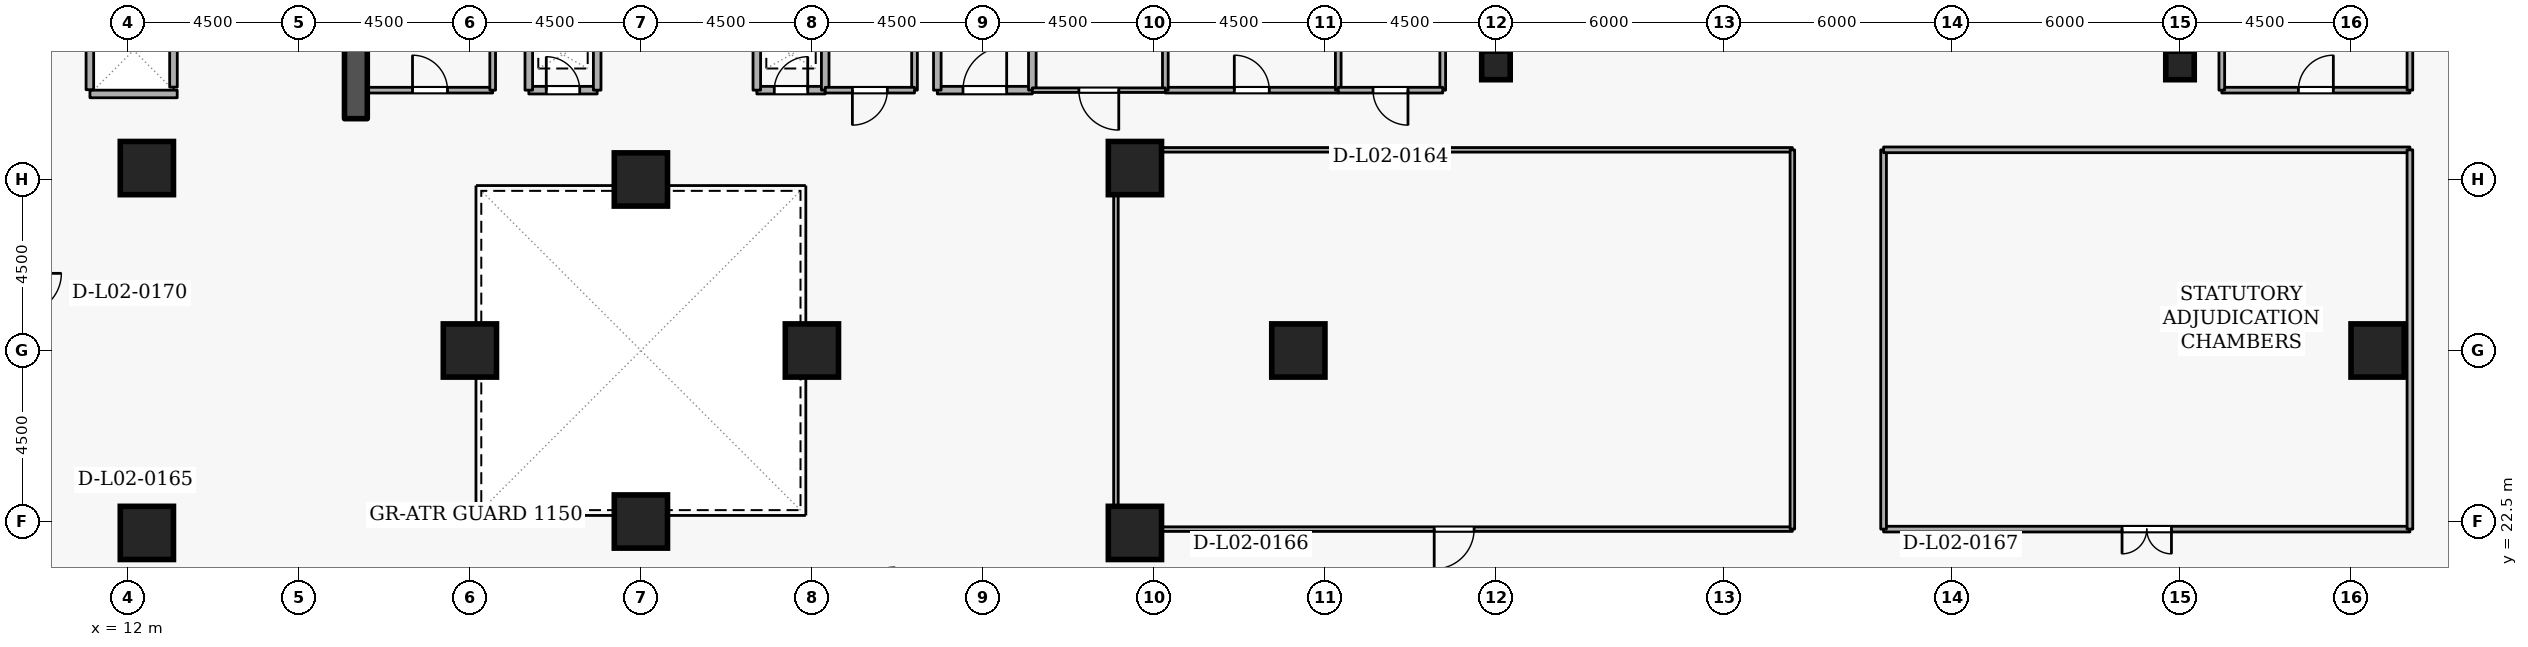
"""IFC4 building model, lengths in metres.
Left out: names, types, materials, properties, quantities, classifications, styles, units other than length and angle.
Written with IfcOpenShell. Run it as: python <this file> out.ifc"""

import sys

from ifc_helpers import new_model, si_unit, direction, frame, frame_2d, origin, origin_2d, place, context, subcontext, project, spatial, rectangle, extrude, element, fill, save


model = new_model("IFC4")
c1 = context("Model", 3, precision=1e-05, world=origin(), true_north=direction((0.0, 1.0)))
c2 = subcontext(c1, "Body", "Model", "MODEL_VIEW")
j1 = project(units=[si_unit("LENGTHUNIT", "METRE"), si_unit("PLANEANGLEUNIT", "RADIAN")], contexts=[c1])
p1 = place(None, origin())
s1 = spatial("IfcSite", under=j1, at=p1, CompositionType="ELEMENT")
p2 = place(p1, origin())
s2 = spatial("IfcBuilding", under=s1, at=p2, CompositionType="ELEMENT")
p3 = place(p2, frame((0.0, 0.0, 9.6)))
s3 = spatial("IfcBuildingStorey", under=s2, at=p3, CompositionType="ELEMENT", Elevation=9.6)
p4 = place(p3, frame((18.0, 33.1, 0.0), z_axis=(0.0, 0.0, 1.0), x_axis=(0.0, 1.0, 0.0)))
e1 = element("IfcWall", 1, at=p4, inside=s3, PredefinedType="SHEAR", context=c2, shape_type="SweptSolid", body=[
    extrude(rectangle(XDim=5.7, YDim=0.6, at=frame_2d((2.85, 0.0))), origin(), (0.0, 0.0, 1.0), 4.5),
])
for number, where, z_axis, x_axis in (
    (2, (42.8, 27.0, 0.0), (0.0, 0.0, 1.0), (1.0, 0.0, 0.0)),
    (3, (12.5, 22.2, 0.0), (0.0, 0.0, 1.0), (1.0, 0.0, 0.0)),
    (4, (38.5, 22.2, 0.0), (0.0, 0.0, 1.0), (1.0, 0.0, 0.0)),
    (5, (12.5, 31.8, 0.0), (0.0, 0.0, 1.0), (1.0, 0.0, 0.0)),
    (6, (38.5, 31.8, 0.0), (0.0, 0.0, 1.0), (1.0, 0.0, 0.0)),
    (7, (25.5, 22.5, 0.0), (0.0, 0.0, 1.0), (1.0, 0.0, 0.0)),
    (8, (25.5, 31.5, 0.0), (0.0, 0.0, 1.0), (1.0, 0.0, 0.0)),
    (9, (21.0, 27.0, 0.0), (0.0, 0.0, 1.0), (1.0, 0.0, 0.0)),
    (10, (30.0, 27.0, 0.0), (0.0, 0.0, 1.0), (1.0, 0.0, 0.0)),
    (11, (71.2, 27.0, 0.0), (0.0, 0.0, 1.0), (1.0, 0.0, 0.0)),
):
    element("IfcColumn", number, at=place(p3, frame(where, z_axis=z_axis, x_axis=x_axis)), inside=s3, PredefinedType="COLUMN", context=c2, shape_type="SweptSolid", body=[
        extrude(rectangle(XDim=1.4, YDim=1.4, at=origin_2d()), origin(), (0.0, 0.0, 1.0), 4.5),
    ])
for number, where, z_axis, x_axis in (
    (12, (48.0, 34.5, 0.0), (0.0, 0.0, 1.0), (1.0, 0.0, 0.0)),
    (13, (66.0, 34.5, 0.0), (0.0, 0.0, 1.0), (1.0, 0.0, 0.0)),
):
    element("IfcColumn", number, at=place(p3, frame(where, z_axis=z_axis, x_axis=x_axis)), inside=s3, PredefinedType="COLUMN", context=c2, shape_type="SweptSolid", body=[
        extrude(rectangle(XDim=0.75, YDim=0.75, at=origin_2d()), origin(), (0.0, 0.0, 1.0), 4.5),
    ])
p5 = place(p3, frame((13.2, 33.93, 0.0), z_axis=(0.0, 0.0, 1.0), x_axis=(0.0, 1.0, 0.0)))
e14 = element("IfcWall", 14, at=p5, inside=s3, PredefinedType="STANDARD", context=c2, shape_type="SweptSolid", body=[
    extrude(rectangle(XDim=1.94, YDim=0.2, at=frame_2d((0.97, 0.0))), origin(), (0.0, 0.0, 1.0), 4.16),
])
p6 = place(p3, frame((11.002, 33.75, 0.0), z_axis=(0.0, 0.0, 1.0), x_axis=(1.0, 0.0, 0.0)))
e15 = element("IfcWall", 15, at=p6, inside=s3, PredefinedType="STANDARD", context=c2, shape_type="SweptSolid", body=[
    extrude(rectangle(XDim=2.296, YDim=0.2, at=frame_2d((1.148, 0.0))), origin(), (0.0, 0.0, 1.0), 4.16),
])
p7 = place(p3, frame((11.0, 33.862, 0.0), z_axis=(0.0, 0.0, 1.0), x_axis=(0.0, 1.0, 0.0)))
e16 = element("IfcWall", 16, at=p7, inside=s3, PredefinedType="STANDARD", context=c2, shape_type="SweptSolid", body=[
    extrude(rectangle(XDim=2.076, YDim=0.2, at=frame_2d((1.038, 0.0))), origin(), (0.0, 0.0, 1.0), 4.16),
])
p8 = place(p3, frame((33.3, 33.85, 0.0), z_axis=(0.0, 0.0, 1.0), x_axis=(1.0, 0.0, 0.0)))
e17 = element("IfcWall", 17, at=p8, inside=s3, PredefinedType="STANDARD", context=c2, shape_type="SweptSolid", body=[
    extrude(rectangle(XDim=2.5, YDim=0.2, at=frame_2d((1.25, 0.0))), origin(), (0.0, 0.0, 1.0), 4.16),
])
p9 = place(p8, frame((0.675, 0.0, 0.0)))
e18 = element("IfcOpeningElement", 18, at=p9, cuts=e17, PredefinedType="OPENING", context=c2, shape_type="SweptSolid", body=[
    extrude(rectangle(XDim=1.15, YDim=2.1, at=frame_2d((0.575, 1.05))), frame((0.0, 0.11, 0.0), z_axis=(0.0, -1.0, 0.0), x_axis=(1.0, 0.0, 0.0)), (0.0, 0.0, 1.0), 0.22),
])
p10 = place(p3, frame((35.8, 33.85, 0.0), z_axis=(0.0, 0.0, 1.0), x_axis=(0.0, 1.0, 0.0)))
e19 = element("IfcWall", 19, at=p10, inside=s3, PredefinedType="STANDARD", context=c2, shape_type="SweptSolid", body=[
    extrude(rectangle(XDim=5.15, YDim=0.2, at=frame_2d((2.575, 0.0))), origin(), (0.0, 0.0, 1.0), 4.16),
])
p11 = place(p3, frame((33.3, 35.6, 0.0), z_axis=(0.0, 0.0, 1.0), x_axis=(0.0, -1.0, 0.0)))
e20 = element("IfcWall", 20, at=p11, inside=s3, PredefinedType="STANDARD", context=c2, shape_type="SweptSolid", body=[
    extrude(rectangle(XDim=1.75, YDim=0.2, at=frame_2d((0.875, 0.0))), origin(), (0.0, 0.0, 1.0), 3.365),
])
p12 = place(p3, frame((22.55, 33.85, 0.0), z_axis=(0.0, 0.0, 1.0), x_axis=(1.0, 0.0, 0.0)))
e21 = element("IfcWall", 21, at=p12, inside=s3, PredefinedType="STANDARD", context=c2, shape_type="SweptSolid", body=[
    extrude(rectangle(XDim=1.8, YDim=0.2, at=frame_2d((0.9, 0.0))), origin(), (0.0, 0.0, 1.0), 4.16),
])
p13 = place(p12, frame((0.46, 0.0, 0.0)))
e22 = element("IfcOpeningElement", 22, at=p13, cuts=e21, PredefinedType="OPENING", context=c2, shape_type="SweptSolid", body=[
    extrude(rectangle(XDim=0.88, YDim=2.04, at=frame_2d((0.44, 1.02))), frame((0.0, 0.11, 0.0), z_axis=(0.0, -1.0, 0.0), x_axis=(1.0, 0.0, 0.0)), (0.0, 0.0, 1.0), 0.22),
])
for number, where, z_axis, x_axis in (
    (23, (24.35, 33.85, 0.0), (0.0, 0.0, 1.0), (0.0, 1.0, 0.0)),
    (24, (22.55, 35.35, 0.0), (0.0, 0.0, 1.0), (0.0, -1.0, 0.0)),
):
    element("IfcWall", number, at=place(p3, frame(where, z_axis=z_axis, x_axis=x_axis)), inside=s3, PredefinedType="STANDARD", context=c2, shape_type="SweptSolid", body=[
        extrude(rectangle(XDim=1.5, YDim=0.2, at=frame_2d((0.75, 0.0))), origin(), (0.0, 0.0, 1.0), 4.16),
    ])
p14 = place(p3, frame((28.55, 33.85, 0.0), z_axis=(0.0, 0.0, 1.0), x_axis=(1.0, 0.0, 0.0)))
e25 = element("IfcWall", 25, at=p14, inside=s3, PredefinedType="STANDARD", context=c2, shape_type="SweptSolid", body=[
    extrude(rectangle(XDim=1.8, YDim=0.2, at=frame_2d((0.9, 0.0))), origin(), (0.0, 0.0, 1.0), 4.16),
])
p15 = place(p14, frame((0.46, 0.0, 0.0)))
e26 = element("IfcOpeningElement", 26, at=p15, cuts=e25, PredefinedType="OPENING", context=c2, shape_type="SweptSolid", body=[
    extrude(rectangle(XDim=0.88, YDim=2.04, at=frame_2d((0.44, 1.02))), frame((0.0, 0.11, 0.0), z_axis=(0.0, -1.0, 0.0), x_axis=(1.0, 0.0, 0.0)), (0.0, 0.0, 1.0), 0.22),
])
for number, where, z_axis, x_axis in (
    (27, (30.35, 33.85, 0.0), (0.0, 0.0, 1.0), (0.0, 1.0, 0.0)),
    (28, (28.55, 35.35, 0.0), (0.0, 0.0, 1.0), (0.0, -1.0, 0.0)),
):
    element("IfcWall", number, at=place(p3, frame(where, z_axis=z_axis, x_axis=x_axis)), inside=s3, PredefinedType="STANDARD", context=c2, shape_type="SweptSolid", body=[
        extrude(rectangle(XDim=1.5, YDim=0.2, at=frame_2d((0.75, 0.0))), origin(), (0.0, 0.0, 1.0), 4.16),
    ])
p16 = place(p3, frame((18.3, 33.85, 0.0), z_axis=(0.0, 0.0, 1.0), x_axis=(1.0, 0.0, 0.0)))
e29 = element("IfcWall", 29, at=p16, inside=s3, PredefinedType="PARTITIONING", context=c2, shape_type="SweptSolid", body=[
    extrude(rectangle(XDim=3.3, YDim=0.15, at=frame_2d((1.65, 0.0))), origin(), (0.0, 0.0, 1.0), 4.16),
])
p17 = place(p16, frame((1.19, 0.0, 0.0)))
e30 = element("IfcOpeningElement", 30, at=p17, cuts=e29, PredefinedType="OPENING", context=c2, shape_type="SweptSolid", body=[
    extrude(rectangle(XDim=0.92, YDim=2.08, at=frame_2d((0.46, 1.04))), frame((0.0, 0.085, 0.0), z_axis=(0.0, -1.0, 0.0), x_axis=(1.0, 0.0, 0.0)), (0.0, 0.0, 1.0), 0.17),
])
p18 = place(p3, frame((21.6, 33.85, 0.0), z_axis=(0.0, 0.0, 1.0), x_axis=(0.0, 1.0, 0.0)))
e31 = element("IfcWall", 31, at=p18, inside=s3, PredefinedType="PARTITIONING", context=c2, shape_type="SweptSolid", body=[
    extrude(rectangle(XDim=1.5, YDim=0.15, at=frame_2d((0.75, 0.0))), origin(), (0.0, 0.0, 1.0), 4.16),
])
p19 = place(p3, frame((32.7, 35.35, 0.0), z_axis=(0.0, 0.0, 1.0), x_axis=(0.0, -1.0, 0.0)))
e32 = element("IfcWall", 32, at=p19, inside=s3, PredefinedType="PARTITIONING", context=c2, shape_type="SweptSolid", body=[
    extrude(rectangle(XDim=1.5, YDim=0.15, at=frame_2d((0.75, 0.0))), origin(), (0.0, 0.0, 1.0), 3.365),
])
p20 = place(p3, frame((32.7, 33.85, 0.0), z_axis=(0.0, 0.0, 1.0), x_axis=(-1.0, 0.0, 0.0)))
e33 = element("IfcWall", 33, at=p20, inside=s3, PredefinedType="PARTITIONING", context=c2, shape_type="SweptSolid", body=[
    extrude(rectangle(XDim=2.35, YDim=0.15, at=frame_2d((1.175, 0.0))), origin(), (0.0, 0.0, 1.0), 4.16),
])
p21 = place(p20, frame((0.715, 0.0, 0.0)))
e34 = element("IfcOpeningElement", 34, at=p21, cuts=e33, PredefinedType="OPENING", context=c2, shape_type="SweptSolid", body=[
    extrude(rectangle(XDim=0.92, YDim=2.08, at=frame_2d((0.46, 1.04))), frame((0.0, 0.085, 0.0), z_axis=(0.0, -1.0, 0.0), x_axis=(1.0, 0.0, 0.0)), (0.0, 0.0, 1.0), 0.17),
])
p22 = place(p3, frame((39.3, 33.85, 0.0), z_axis=(0.0, 0.0, 1.0), x_axis=(1.0, 0.0, 0.0)))
e35 = element("IfcWall", 35, at=p22, inside=s3, PredefinedType="PARTITIONING", context=c2, shape_type="SweptSolid", body=[
    extrude(rectangle(XDim=4.55, YDim=0.15, at=frame_2d((2.275, 0.0))), origin(), (0.0, 0.0, 1.0), 4.16),
])
p23 = place(p22, frame((1.815, 0.0, 0.0)))
e36 = element("IfcOpeningElement", 36, at=p23, cuts=e35, PredefinedType="OPENING", context=c2, shape_type="SweptSolid", body=[
    extrude(rectangle(XDim=0.92, YDim=2.08, at=frame_2d((0.46, 1.04))), frame((0.0, 0.085, 0.0), z_axis=(0.0, -1.0, 0.0), x_axis=(1.0, 0.0, 0.0)), (0.0, 0.0, 1.0), 0.17),
])
for number, where, z_axis, x_axis in (
    (37, (43.85, 33.85, 0.0), (0.0, 0.0, 1.0), (0.0, 1.0, 0.0)),
    (38, (39.3, 37.8, 0.0), (0.0, 0.0, 1.0), (0.0, -1.0, 0.0)),
):
    element("IfcWall", number, at=place(p3, frame(where, z_axis=z_axis, x_axis=x_axis)), inside=s3, PredefinedType="PARTITIONING", context=c2, shape_type="SweptSolid", body=[
        extrude(rectangle(XDim=3.95, YDim=0.15, at=frame_2d((1.975, 0.0))), origin(), (0.0, 0.0, 1.0), 4.16),
    ])
p24 = place(p3, frame((67.1, 33.85, 0.0), z_axis=(0.0, 0.0, 1.0), x_axis=(1.0, 0.0, 0.0)))
e39 = element("IfcWall", 39, at=p24, inside=s3, PredefinedType="PARTITIONING", context=c2, shape_type="SweptSolid", body=[
    extrude(rectangle(XDim=4.95, YDim=0.15, at=frame_2d((2.475, 0.0))), origin(), (0.0, 0.0, 1.0), 4.16),
])
p25 = place(p24, frame((2.015, 0.0, 0.0)))
e40 = element("IfcOpeningElement", 40, at=p25, cuts=e39, PredefinedType="OPENING", context=c2, shape_type="SweptSolid", body=[
    extrude(rectangle(XDim=0.92, YDim=2.08, at=frame_2d((0.46, 1.04))), frame((0.0, 0.085, 0.0), z_axis=(0.0, -1.0, 0.0), x_axis=(1.0, 0.0, 0.0)), (0.0, 0.0, 1.0), 0.17),
])
for number, where, z_axis, x_axis in (
    (41, (72.05, 33.85, 0.0), (0.0, 0.0, 1.0), (0.0, 1.0, 0.0)),
    (42, (67.1, 37.8, 0.0), (0.0, 0.0, 1.0), (0.0, -1.0, 0.0)),
    (43, (46.6, 37.8, 0.0), (0.0, 0.0, 1.0), (0.0, -1.0, 0.0)),
):
    element("IfcWall", number, at=place(p3, frame(where, z_axis=z_axis, x_axis=x_axis)), inside=s3, PredefinedType="PARTITIONING", context=c2, shape_type="SweptSolid", body=[
        extrude(rectangle(XDim=3.95, YDim=0.15, at=frame_2d((1.975, 0.0))), origin(), (0.0, 0.0, 1.0), 4.16),
    ])
p26 = place(p3, frame((46.6, 33.85, 0.0), z_axis=(0.0, 0.0, 1.0), x_axis=(-1.0, 0.0, 0.0)))
e44 = element("IfcWall", 44, at=p26, inside=s3, PredefinedType="PARTITIONING", context=c2, shape_type="SweptSolid", body=[
    extrude(rectangle(XDim=2.75, YDim=0.15, at=frame_2d((1.375, 0.0))), origin(), (0.0, 0.0, 1.0), 4.16),
])
p27 = place(p26, frame((0.915, 0.0, 0.0)))
e45 = element("IfcOpeningElement", 45, at=p27, cuts=e44, PredefinedType="OPENING", context=c2, shape_type="SweptSolid", body=[
    extrude(rectangle(XDim=0.92, YDim=2.08, at=frame_2d((0.46, 1.04))), frame((0.0, 0.085, 0.0), z_axis=(0.0, -1.0, 0.0), x_axis=(1.0, 0.0, 0.0)), (0.0, 0.0, 1.0), 0.17),
])
p28 = place(p3, frame((55.8, 22.3, 0.0), z_axis=(0.0, 0.0, 1.0), x_axis=(-1.0, 0.0, 0.0)))
e46 = element("IfcWall", 46, at=p28, inside=s3, PredefinedType="PARTITIONING", context=c2, shape_type="SweptSolid", body=[
    extrude(rectangle(XDim=17.8, YDim=0.12, at=frame_2d((8.9, 0.0))), origin(), (0.0, 0.0, 1.0), 4.16),
])
p29 = place(p28, frame((8.375, 0.0, 0.0)))
e47 = element("IfcOpeningElement", 47, at=p29, cuts=e46, PredefinedType="OPENING", context=c2, shape_type="SweptSolid", body=[
    extrude(rectangle(XDim=1.05, YDim=2.1, at=frame_2d((0.525, 1.05))), frame((0.0, 0.07, 0.0), z_axis=(0.0, -1.0, 0.0), x_axis=(1.0, 0.0, 0.0)), (0.0, 0.0, 1.0), 0.14),
])
p30 = place(p3, frame((38.0, 22.3, 0.0), z_axis=(0.0, 0.0, 1.0), x_axis=(0.0, 1.0, 0.0)))
e48 = element("IfcWall", 48, at=p30, inside=s3, PredefinedType="PARTITIONING", context=c2, shape_type="SweptSolid", body=[
    extrude(rectangle(XDim=9.98, YDim=0.12, at=frame_2d((4.99, 0.0))), origin(), (0.0, 0.0, 1.0), 4.16),
])
p31 = place(p3, frame((38.0, 32.28, 0.0), z_axis=(0.0, 0.0, 1.0), x_axis=(1.0, 0.0, 0.0)))
e49 = element("IfcWall", 49, at=p31, inside=s3, PredefinedType="PARTITIONING", context=c2, shape_type="SweptSolid", body=[
    extrude(rectangle(XDim=17.8, YDim=0.12, at=frame_2d((8.9, 0.0))), origin(), (0.0, 0.0, 1.0), 4.16),
])
p32 = place(p3, frame((55.8, 32.28, 0.0), z_axis=(0.0, 0.0, 1.0), x_axis=(0.0, -1.0, 0.0)))
e50 = element("IfcWall", 50, at=p32, inside=s3, PredefinedType="PARTITIONING", context=c2, shape_type="SweptSolid", body=[
    extrude(rectangle(XDim=9.98, YDim=0.12, at=frame_2d((4.99, 0.0))), origin(), (0.0, 0.0, 1.0), 4.16),
])
p33 = place(p3, frame((72.05, 22.3, 0.0), z_axis=(0.0, 0.0, 1.0), x_axis=(-1.0, 0.0, 0.0)))
e51 = element("IfcWall", 51, at=p33, inside=s3, PredefinedType="PARTITIONING", context=c2, shape_type="SweptSolid", body=[
    extrude(rectangle(XDim=13.85, YDim=0.15, at=frame_2d((6.925, 0.0))), origin(), (0.0, 0.0, 1.0), 4.16),
])
p34 = place(p33, frame((6.275, 0.0, 0.0)))
e52 = element("IfcOpeningElement", 52, at=p34, cuts=e51, PredefinedType="OPENING", context=c2, shape_type="SweptSolid", body=[
    extrude(rectangle(XDim=1.3, YDim=2.12, at=frame_2d((0.65, 1.06))), frame((0.0, 0.085, 0.0), z_axis=(0.0, -1.0, 0.0), x_axis=(1.0, 0.0, 0.0)), (0.0, 0.0, 1.0), 0.17),
])
p35 = place(p3, frame((58.2, 22.3, 0.0), z_axis=(0.0, 0.0, 1.0), x_axis=(0.0, 1.0, 0.0)))
e53 = element("IfcWall", 53, at=p35, inside=s3, PredefinedType="PARTITIONING", context=c2, shape_type="SweptSolid", body=[
    extrude(rectangle(XDim=9.98, YDim=0.15, at=frame_2d((4.99, 0.0))), origin(), (0.0, 0.0, 1.0), 4.16),
])
p36 = place(p3, frame((58.2, 32.28, 0.0), z_axis=(0.0, 0.0, 1.0), x_axis=(1.0, 0.0, 0.0)))
e54 = element("IfcWall", 54, at=p36, inside=s3, PredefinedType="PARTITIONING", context=c2, shape_type="SweptSolid", body=[
    extrude(rectangle(XDim=13.85, YDim=0.15, at=frame_2d((6.925, 0.0))), origin(), (0.0, 0.0, 1.0), 4.16),
])
p37 = place(p3, frame((72.05, 32.28, 0.0), z_axis=(0.0, 0.0, 1.0), x_axis=(0.0, -1.0, 0.0)))
e55 = element("IfcWall", 55, at=p37, inside=s3, PredefinedType="PARTITIONING", context=c2, shape_type="SweptSolid", body=[
    extrude(rectangle(XDim=9.98, YDim=0.15, at=frame_2d((4.99, 0.0))), origin(), (0.0, 0.0, 1.0), 4.16),
])
p38 = place(p3, frame((39.3, 33.85, 0.0), z_axis=(0.0, 0.0, 1.0), x_axis=(-1.0, 0.0, 0.0)))
e56 = element("IfcWall", 56, at=p38, inside=s3, PredefinedType="PARTITIONING", context=c2, shape_type="SweptSolid", body=[
    extrude(rectangle(XDim=3.5, YDim=0.12, at=frame_2d((1.75, 0.0))), origin(), (0.0, 0.0, 1.0), 4.16),
])
p39 = place(p38, frame((1.225, 0.0, 0.0)))
e57 = element("IfcOpeningElement", 57, at=p39, cuts=e56, PredefinedType="OPENING", context=c2, shape_type="SweptSolid", body=[
    extrude(rectangle(XDim=1.05, YDim=2.1, at=frame_2d((0.525, 1.05))), frame((0.0, 0.07, 0.0), z_axis=(0.0, -1.0, 0.0), x_axis=(1.0, 0.0, 0.0)), (0.0, 0.0, 1.0), 0.14),
])
p40 = place(p9, origin())
e58 = element("IfcDoor", 58, at=p40, inside=s3, OperationType="SINGLE_SWING_RIGHT", PredefinedType="DOOR", context=c2, shape_type="SweptSolid", body=[
    extrude(rectangle(XDim=1.15, YDim=2.1, at=frame_2d((0.575, 1.05))), frame((0.0, 0.025, 0.0), z_axis=(0.0, -1.0, 0.0), x_axis=(1.0, 0.0, 0.0)), (0.0, 0.0, 1.0), 0.05),
])
fill(e18, e58)
p41 = place(p13, origin())
e59 = element("IfcDoor", 59, at=p41, inside=s3, OperationType="SINGLE_SWING_LEFT", PredefinedType="DOOR", context=c2, shape_type="SweptSolid", body=[
    extrude(rectangle(XDim=0.88, YDim=2.04, at=frame_2d((0.44, 1.02))), frame((0.0, 0.025, 0.0), z_axis=(0.0, -1.0, 0.0), x_axis=(1.0, 0.0, 0.0)), (0.0, 0.0, 1.0), 0.05),
])
fill(e22, e59)
p42 = place(p15, origin())
e60 = element("IfcDoor", 60, at=p42, inside=s3, OperationType="SINGLE_SWING_RIGHT", PredefinedType="DOOR", context=c2, shape_type="SweptSolid", body=[
    extrude(rectangle(XDim=0.88, YDim=2.04, at=frame_2d((0.44, 1.02))), frame((0.0, 0.025, 0.0), z_axis=(0.0, -1.0, 0.0), x_axis=(1.0, 0.0, 0.0)), (0.0, 0.0, 1.0), 0.05),
])
fill(e26, e60)
p43 = place(p17, origin())
e61 = element("IfcDoor", 61, at=p43, inside=s3, OperationType="SINGLE_SWING_LEFT", PredefinedType="DOOR", context=c2, shape_type="SweptSolid", body=[
    extrude(rectangle(XDim=0.92, YDim=2.08, at=frame_2d((0.46, 1.04))), frame((0.0, 0.025, 0.0), z_axis=(0.0, -1.0, 0.0), x_axis=(1.0, 0.0, 0.0)), (0.0, 0.0, 1.0), 0.05),
])
fill(e30, e61)
p44 = place(p21, origin())
e62 = element("IfcDoor", 62, at=p44, inside=s3, OperationType="SINGLE_SWING_RIGHT", PredefinedType="DOOR", context=c2, shape_type="SweptSolid", body=[
    extrude(rectangle(XDim=0.92, YDim=2.08, at=frame_2d((0.46, 1.04))), frame((0.0, 0.025, 0.0), z_axis=(0.0, -1.0, 0.0), x_axis=(1.0, 0.0, 0.0)), (0.0, 0.0, 1.0), 0.05),
])
fill(e34, e62)
p45 = place(p23, origin())
e63 = element("IfcDoor", 63, at=p45, inside=s3, OperationType="SINGLE_SWING_LEFT", PredefinedType="DOOR", context=c2, shape_type="SweptSolid", body=[
    extrude(rectangle(XDim=0.92, YDim=2.08, at=frame_2d((0.46, 1.04))), frame((0.0, 0.025, 0.0), z_axis=(0.0, -1.0, 0.0), x_axis=(1.0, 0.0, 0.0)), (0.0, 0.0, 1.0), 0.05),
])
fill(e36, e63)
p46 = place(p25, origin())
e64 = element("IfcDoor", 64, at=p46, inside=s3, OperationType="SINGLE_SWING_RIGHT", PredefinedType="DOOR", context=c2, shape_type="SweptSolid", body=[
    extrude(rectangle(XDim=0.92, YDim=2.08, at=frame_2d((0.46, 1.04))), frame((0.0, 0.025, 0.0), z_axis=(0.0, -1.0, 0.0), x_axis=(1.0, 0.0, 0.0)), (0.0, 0.0, 1.0), 0.05),
])
fill(e40, e64)
p47 = place(p27, origin())
e65 = element("IfcDoor", 65, at=p47, inside=s3, OperationType="SINGLE_SWING_LEFT", PredefinedType="DOOR", context=c2, shape_type="SweptSolid", body=[
    extrude(rectangle(XDim=0.92, YDim=2.08, at=frame_2d((0.46, 1.04))), frame((0.0, 0.025, 0.0), z_axis=(0.0, -1.0, 0.0), x_axis=(1.0, 0.0, 0.0)), (0.0, 0.0, 1.0), 0.05),
])
fill(e45, e65)
p48 = place(p29, origin())
e66 = element("IfcDoor", 66, at=p48, inside=s3, OperationType="SINGLE_SWING_RIGHT", PredefinedType="DOOR", context=c2, shape_type="SweptSolid", body=[
    extrude(rectangle(XDim=1.05, YDim=2.1, at=frame_2d((0.525, 1.05))), frame((0.0, 0.025, 0.0), z_axis=(0.0, -1.0, 0.0), x_axis=(1.0, 0.0, 0.0)), (0.0, 0.0, 1.0), 0.05),
])
fill(e47, e66)
p49 = place(p34, origin())
e67 = element("IfcDoor", 67, at=p49, inside=s3, OperationType="DOUBLE_DOOR_SINGLE_SWING", PredefinedType="DOOR", context=c2, shape_type="SweptSolid", body=[
    extrude(rectangle(XDim=1.3, YDim=2.12, at=frame_2d((0.65, 1.06))), frame((0.0, 0.025, 0.0), z_axis=(0.0, -1.0, 0.0), x_axis=(1.0, 0.0, 0.0)), (0.0, 0.0, 1.0), 0.05),
])
fill(e52, e67)
p50 = place(p39, origin())
e68 = element("IfcDoor", 68, at=p50, inside=s3, OperationType="SINGLE_SWING_LEFT", PredefinedType="DOOR", context=c2, shape_type="SweptSolid", body=[
    extrude(rectangle(XDim=1.05, YDim=2.1, at=frame_2d((0.525, 1.05))), frame((0.0, 0.025, 0.0), z_axis=(0.0, -1.0, 0.0), x_axis=(1.0, 0.0, 0.0)), (0.0, 0.0, 1.0), 0.05),
])
fill(e57, e68)
save(model, sys.argv[1])
